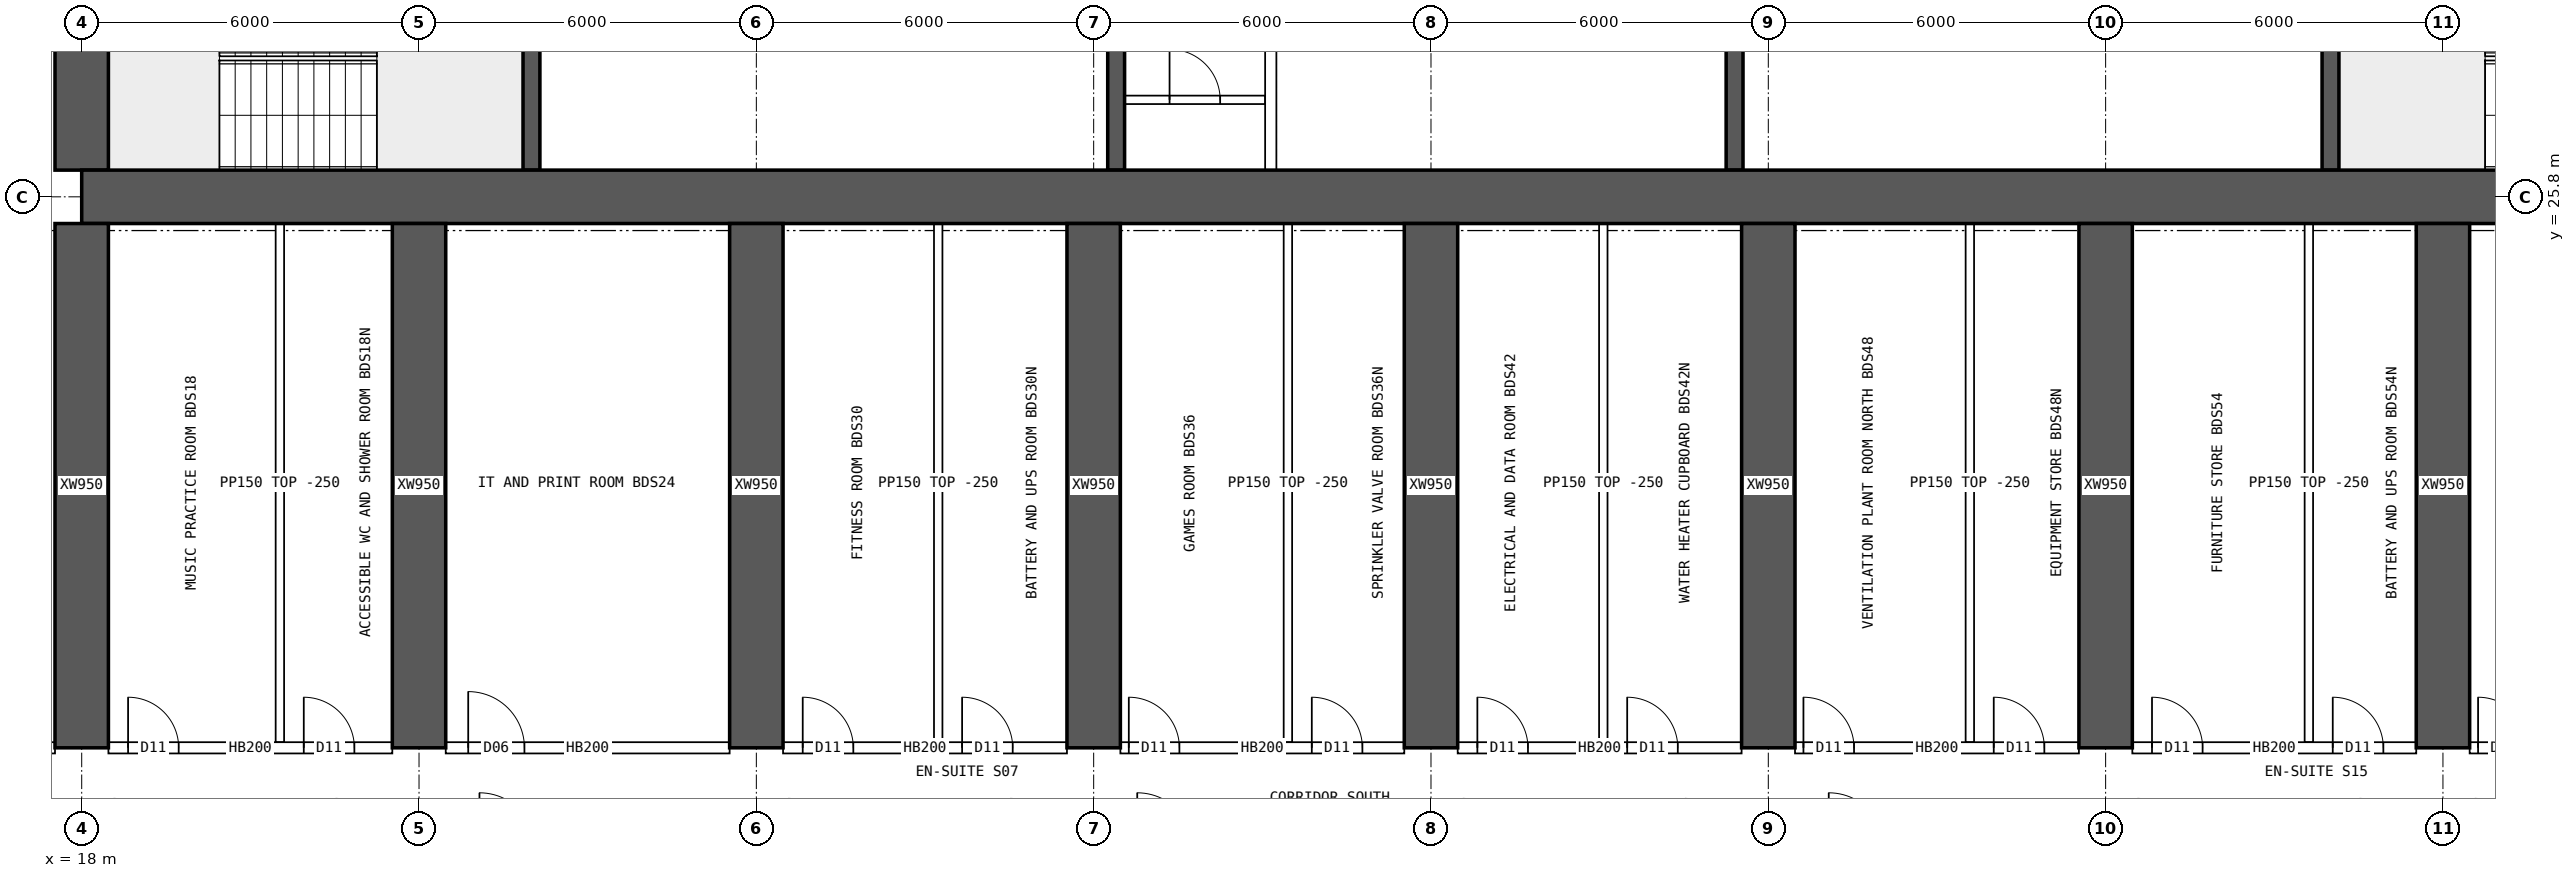
"""IFC4 building model, lengths in metres.
Left out: names, types, materials, properties, quantities, classifications, styles, units other than length and angle.
Written with IfcOpenShell. Run it as: python <this file> out.ifc"""

import sys

from ifc_helpers import new_model, si_unit, direction, frame, frame_2d, origin, place, context, subcontext, project, spatial, rectangle, extrude, element, fill, save


model = new_model("IFC4")
c1 = context("Model", 3, precision=1e-05, world=origin(), true_north=direction((0.0, 1.0)))
c2 = subcontext(c1, "Body", "Model", "MODEL_VIEW")
j1 = project(units=[si_unit("LENGTHUNIT", "METRE"), si_unit("PLANEANGLEUNIT", "RADIAN")], contexts=[c1])
p1 = place(None, origin())
s1 = spatial("IfcSite", under=j1, at=p1, CompositionType="ELEMENT")
p2 = place(p1, origin())
s2 = spatial("IfcBuilding", under=s1, at=p2, CompositionType="ELEMENT")
p3 = place(p2, frame((0.0, 0.0, 99.4)))
s3 = spatial("IfcBuildingStorey", under=s2, at=p3, CompositionType="ELEMENT", Elevation=99.4)
p4 = place(p3, frame((18.0, 25.8, 0.0), z_axis=(0.0, 0.0, 1.0), x_axis=(1.0, 0.0, 0.0)))
e1 = element("IfcWall", 1, at=p4, inside=s3, PredefinedType="SHEAR", context=c2, shape_type="SweptSolid", body=[
    extrude(rectangle(XDim=48.0, YDim=0.95, at=frame_2d((24.0, 0.0))), origin(), (0.0, 0.0, 1.0), 3.75),
])
p5 = place(p3, frame((18.0, 26.275, 0.0), z_axis=(0.0, 0.0, 1.0), x_axis=(0.0, 1.0, 0.0)))
e2 = element("IfcWall", 2, at=p5, inside=s3, PredefinedType="SHEAR", context=c2, shape_type="SweptSolid", body=[
    extrude(rectangle(XDim=11.45, YDim=0.95, at=frame_2d((5.725, 0.0))), origin(), (0.0, 0.0, 1.0), 3.75),
])
p6 = place(p5, frame((5.025, 0.0, 0.0)))
e3 = element("IfcOpeningElement", 3, at=p6, cuts=e2, PredefinedType="OPENING", context=c2, shape_type="SweptSolid", body=[
    extrude(rectangle(XDim=1.2, YDim=2.1, at=frame_2d((0.6, 1.05))), frame((0.0, 0.485, 0.0), z_axis=(0.0, -1.0, 0.0), x_axis=(1.0, 0.0, 0.0)), (0.0, 0.0, 1.0), 0.97),
])
for number, where, z_axis, x_axis in (
    (4, (26.0, 26.275, 0.0), (0.0, 0.0, 1.0), (0.0, 1.0, 0.0)),
    (5, (58.0, 26.275, 0.0), (0.0, 0.0, 1.0), (0.0, 1.0, 0.0)),
    (6, (36.4, 26.275, 0.0), (0.0, 0.0, 1.0), (0.0, 1.0, 0.0)),
    (7, (47.4, 26.275, 0.0), (0.0, 0.0, 1.0), (0.0, 1.0, 0.0)),
):
    element("IfcWall", number, at=place(p3, frame(where, z_axis=z_axis, x_axis=x_axis)), inside=s3, PredefinedType="SHEAR", context=c2, shape_type="SweptSolid", body=[
        extrude(rectangle(XDim=3.975, YDim=0.3, at=frame_2d((1.988, 0.0))), origin(), (0.0, 0.0, 1.0), 3.75),
    ])
for number, where, z_axis, x_axis in (
    (8, (18.0, 16.0, 0.0), (0.0, 0.0, 1.0), (0.0, 1.0, 0.0)),
    (9, (24.0, 16.0, 0.0), (0.0, 0.0, 1.0), (0.0, 1.0, 0.0)),
    (10, (30.0, 16.0, 0.0), (0.0, 0.0, 1.0), (0.0, 1.0, 0.0)),
    (11, (36.0, 16.0, 0.0), (0.0, 0.0, 1.0), (0.0, 1.0, 0.0)),
    (12, (42.0, 16.0, 0.0), (0.0, 0.0, 1.0), (0.0, 1.0, 0.0)),
    (13, (48.0, 16.0, 0.0), (0.0, 0.0, 1.0), (0.0, 1.0, 0.0)),
    (14, (54.0, 16.0, 0.0), (0.0, 0.0, 1.0), (0.0, 1.0, 0.0)),
    (15, (60.0, 16.0, 0.0), (0.0, 0.0, 1.0), (0.0, 1.0, 0.0)),
):
    element("IfcWall", number, at=place(p3, frame(where, z_axis=z_axis, x_axis=x_axis)), inside=s3, PredefinedType="SHEAR", context=c2, shape_type="SweptSolid", body=[
        extrude(rectangle(XDim=9.325, YDim=0.95, at=frame_2d((4.663, 0.0))), origin(), (0.0, 0.0, 1.0), 3.75),
    ])
p7 = place(p3, frame((36.55, 27.525, 0.0), z_axis=(0.0, 0.0, 1.0), x_axis=(1.0, 0.0, 0.0)))
e16 = element("IfcWall", 16, at=p7, inside=s3, PredefinedType="SOLIDWALL", context=c2, shape_type="SweptSolid", body=[
    extrude(rectangle(XDim=2.5, YDim=0.15, at=frame_2d((1.25, 0.0))), origin(), (0.0, 0.0, 1.0), 3.5),
])
p8 = place(p7, frame((0.8, 0.0, 0.0)))
e17 = element("IfcOpeningElement", 17, at=p8, cuts=e16, PredefinedType="OPENING", context=c2, shape_type="SweptSolid", body=[
    extrude(rectangle(XDim=0.9, YDim=2.1, at=frame_2d((0.45, 1.05))), frame((0.0, 0.085, 0.0), z_axis=(0.0, -1.0, 0.0), x_axis=(1.0, 0.0, 0.0)), (0.0, 0.0, 1.0), 0.17),
])
p9 = place(p3, frame((39.15, 26.275, 0.0), z_axis=(0.0, 0.0, 1.0), x_axis=(0.0, 1.0, 0.0)))
e18 = element("IfcWall", 18, at=p9, inside=s3, PredefinedType="SOLIDWALL", context=c2, shape_type="SweptSolid", body=[
    extrude(rectangle(XDim=3.975, YDim=0.2, at=frame_2d((1.988, 0.0))), origin(), (0.0, 0.0, 1.0), 3.5),
])
p10 = place(p3, frame((12.475, 16.0, 0.0), z_axis=(0.0, 0.0, 1.0), x_axis=(1.0, 0.0, 0.0)))
e19 = element("IfcWall", 19, at=p10, inside=s3, PredefinedType="SOLIDWALL", context=c2, shape_type="SweptSolid", body=[
    extrude(rectangle(XDim=5.05, YDim=0.2, at=frame_2d((2.525, 0.0))), origin(), (0.0, 0.0, 1.0), 3.5),
])
p11 = place(p10, frame((3.325, 0.0, 0.0)))
e20 = element("IfcOpeningElement", 20, at=p11, cuts=e19, PredefinedType="OPENING", context=c2, shape_type="SweptSolid", body=[
    extrude(rectangle(XDim=1.6, YDim=2.1, at=frame_2d((0.8, 1.05))), frame((0.0, 0.11, 0.0), z_axis=(0.0, -1.0, 0.0), x_axis=(1.0, 0.0, 0.0)), (0.0, 0.0, 1.0), 0.22),
])
p12 = place(p3, frame((18.475, 16.0, 0.0), z_axis=(0.0, 0.0, 1.0), x_axis=(1.0, 0.0, 0.0)))
e21 = element("IfcWall", 21, at=p12, inside=s3, PredefinedType="SOLIDWALL", context=c2, shape_type="SweptSolid", body=[
    extrude(rectangle(XDim=5.05, YDim=0.2, at=frame_2d((2.525, 0.0))), origin(), (0.0, 0.0, 1.0), 3.5),
])
p13 = place(p12, frame((0.35, 0.0, 0.0)))
e22 = element("IfcOpeningElement", 22, at=p13, cuts=e21, PredefinedType="OPENING", context=c2, shape_type="SweptSolid", body=[
    extrude(rectangle(XDim=0.9, YDim=2.1, at=frame_2d((0.45, 1.05))), frame((0.0, 0.11, 0.0), z_axis=(0.0, -1.0, 0.0), x_axis=(1.0, 0.0, 0.0)), (0.0, 0.0, 1.0), 0.22),
])
p14 = place(p12, frame((3.475, 0.0, 0.0)))
e23 = element("IfcOpeningElement", 23, at=p14, cuts=e21, PredefinedType="OPENING", context=c2, shape_type="SweptSolid", body=[
    extrude(rectangle(XDim=0.9, YDim=2.1, at=frame_2d((0.45, 1.05))), frame((0.0, 0.11, 0.0), z_axis=(0.0, -1.0, 0.0), x_axis=(1.0, 0.0, 0.0)), (0.0, 0.0, 1.0), 0.22),
])
p15 = place(p3, frame((24.475, 16.0, 0.0), z_axis=(0.0, 0.0, 1.0), x_axis=(1.0, 0.0, 0.0)))
e24 = element("IfcWall", 24, at=p15, inside=s3, PredefinedType="SOLIDWALL", context=c2, shape_type="SweptSolid", body=[
    extrude(rectangle(XDim=5.05, YDim=0.2, at=frame_2d((2.525, 0.0))), origin(), (0.0, 0.0, 1.0), 3.5),
])
p16 = place(p15, frame((0.4, 0.0, 0.0)))
e25 = element("IfcOpeningElement", 25, at=p16, cuts=e24, PredefinedType="OPENING", context=c2, shape_type="SweptSolid", body=[
    extrude(rectangle(XDim=1.0, YDim=2.1, at=frame_2d((0.5, 1.05))), frame((0.0, 0.11, 0.0), z_axis=(0.0, -1.0, 0.0), x_axis=(1.0, 0.0, 0.0)), (0.0, 0.0, 1.0), 0.22),
])
p17 = place(p3, frame((30.475, 16.0, 0.0), z_axis=(0.0, 0.0, 1.0), x_axis=(1.0, 0.0, 0.0)))
e26 = element("IfcWall", 26, at=p17, inside=s3, PredefinedType="SOLIDWALL", context=c2, shape_type="SweptSolid", body=[
    extrude(rectangle(XDim=5.05, YDim=0.2, at=frame_2d((2.525, 0.0))), origin(), (0.0, 0.0, 1.0), 3.5),
])
p18 = place(p17, frame((0.35, 0.0, 0.0)))
e27 = element("IfcOpeningElement", 27, at=p18, cuts=e26, PredefinedType="OPENING", context=c2, shape_type="SweptSolid", body=[
    extrude(rectangle(XDim=0.9, YDim=2.1, at=frame_2d((0.45, 1.05))), frame((0.0, 0.11, 0.0), z_axis=(0.0, -1.0, 0.0), x_axis=(1.0, 0.0, 0.0)), (0.0, 0.0, 1.0), 0.22),
])
p19 = place(p17, frame((3.185, 0.0, 0.0)))
e28 = element("IfcOpeningElement", 28, at=p19, cuts=e26, PredefinedType="OPENING", context=c2, shape_type="SweptSolid", body=[
    extrude(rectangle(XDim=0.9, YDim=2.1, at=frame_2d((0.45, 1.05))), frame((0.0, 0.11, 0.0), z_axis=(0.0, -1.0, 0.0), x_axis=(1.0, 0.0, 0.0)), (0.0, 0.0, 1.0), 0.22),
])
p20 = place(p3, frame((36.475, 16.0, 0.0), z_axis=(0.0, 0.0, 1.0), x_axis=(1.0, 0.0, 0.0)))
e29 = element("IfcWall", 29, at=p20, inside=s3, PredefinedType="SOLIDWALL", context=c2, shape_type="SweptSolid", body=[
    extrude(rectangle(XDim=5.05, YDim=0.2, at=frame_2d((2.525, 0.0))), origin(), (0.0, 0.0, 1.0), 3.5),
])
p21 = place(p20, frame((0.15, 0.0, 0.0)))
e30 = element("IfcOpeningElement", 30, at=p21, cuts=e29, PredefinedType="OPENING", context=c2, shape_type="SweptSolid", body=[
    extrude(rectangle(XDim=0.9, YDim=2.1, at=frame_2d((0.45, 1.05))), frame((0.0, 0.11, 0.0), z_axis=(0.0, -1.0, 0.0), x_axis=(1.0, 0.0, 0.0)), (0.0, 0.0, 1.0), 0.22),
])
p22 = place(p20, frame((3.405, 0.0, 0.0)))
e31 = element("IfcOpeningElement", 31, at=p22, cuts=e29, PredefinedType="OPENING", context=c2, shape_type="SweptSolid", body=[
    extrude(rectangle(XDim=0.9, YDim=2.1, at=frame_2d((0.45, 1.05))), frame((0.0, 0.11, 0.0), z_axis=(0.0, -1.0, 0.0), x_axis=(1.0, 0.0, 0.0)), (0.0, 0.0, 1.0), 0.22),
])
p23 = place(p3, frame((42.475, 16.0, 0.0), z_axis=(0.0, 0.0, 1.0), x_axis=(1.0, 0.0, 0.0)))
e32 = element("IfcWall", 32, at=p23, inside=s3, PredefinedType="SOLIDWALL", context=c2, shape_type="SweptSolid", body=[
    extrude(rectangle(XDim=5.05, YDim=0.2, at=frame_2d((2.525, 0.0))), origin(), (0.0, 0.0, 1.0), 3.5),
])
p24 = place(p23, frame((0.35, 0.0, 0.0)))
e33 = element("IfcOpeningElement", 33, at=p24, cuts=e32, PredefinedType="OPENING", context=c2, shape_type="SweptSolid", body=[
    extrude(rectangle(XDim=0.9, YDim=2.1, at=frame_2d((0.45, 1.05))), frame((0.0, 0.11, 0.0), z_axis=(0.0, -1.0, 0.0), x_axis=(1.0, 0.0, 0.0)), (0.0, 0.0, 1.0), 0.22),
])
p25 = place(p23, frame((3.015, 0.0, 0.0)))
e34 = element("IfcOpeningElement", 34, at=p25, cuts=e32, PredefinedType="OPENING", context=c2, shape_type="SweptSolid", body=[
    extrude(rectangle(XDim=0.9, YDim=2.1, at=frame_2d((0.45, 1.05))), frame((0.0, 0.11, 0.0), z_axis=(0.0, -1.0, 0.0), x_axis=(1.0, 0.0, 0.0)), (0.0, 0.0, 1.0), 0.22),
])
p26 = place(p3, frame((48.475, 16.0, 0.0), z_axis=(0.0, 0.0, 1.0), x_axis=(1.0, 0.0, 0.0)))
e35 = element("IfcWall", 35, at=p26, inside=s3, PredefinedType="SOLIDWALL", context=c2, shape_type="SweptSolid", body=[
    extrude(rectangle(XDim=5.05, YDim=0.2, at=frame_2d((2.525, 0.0))), origin(), (0.0, 0.0, 1.0), 3.5),
])
p27 = place(p26, frame((0.15, 0.0, 0.0)))
e36 = element("IfcOpeningElement", 36, at=p27, cuts=e35, PredefinedType="OPENING", context=c2, shape_type="SweptSolid", body=[
    extrude(rectangle(XDim=0.9, YDim=2.1, at=frame_2d((0.45, 1.05))), frame((0.0, 0.11, 0.0), z_axis=(0.0, -1.0, 0.0), x_axis=(1.0, 0.0, 0.0)), (0.0, 0.0, 1.0), 0.22),
])
p28 = place(p26, frame((3.535, 0.0, 0.0)))
e37 = element("IfcOpeningElement", 37, at=p28, cuts=e35, PredefinedType="OPENING", context=c2, shape_type="SweptSolid", body=[
    extrude(rectangle(XDim=0.9, YDim=2.1, at=frame_2d((0.45, 1.05))), frame((0.0, 0.11, 0.0), z_axis=(0.0, -1.0, 0.0), x_axis=(1.0, 0.0, 0.0)), (0.0, 0.0, 1.0), 0.22),
])
p29 = place(p3, frame((54.475, 16.0, 0.0), z_axis=(0.0, 0.0, 1.0), x_axis=(1.0, 0.0, 0.0)))
e38 = element("IfcWall", 38, at=p29, inside=s3, PredefinedType="SOLIDWALL", context=c2, shape_type="SweptSolid", body=[
    extrude(rectangle(XDim=5.05, YDim=0.2, at=frame_2d((2.525, 0.0))), origin(), (0.0, 0.0, 1.0), 3.5),
])
p30 = place(p29, frame((0.35, 0.0, 0.0)))
e39 = element("IfcOpeningElement", 39, at=p30, cuts=e38, PredefinedType="OPENING", context=c2, shape_type="SweptSolid", body=[
    extrude(rectangle(XDim=0.9, YDim=2.1, at=frame_2d((0.45, 1.05))), frame((0.0, 0.11, 0.0), z_axis=(0.0, -1.0, 0.0), x_axis=(1.0, 0.0, 0.0)), (0.0, 0.0, 1.0), 0.22),
])
p31 = place(p29, frame((3.565, 0.0, 0.0)))
e40 = element("IfcOpeningElement", 40, at=p31, cuts=e38, PredefinedType="OPENING", context=c2, shape_type="SweptSolid", body=[
    extrude(rectangle(XDim=0.9, YDim=2.1, at=frame_2d((0.45, 1.05))), frame((0.0, 0.11, 0.0), z_axis=(0.0, -1.0, 0.0), x_axis=(1.0, 0.0, 0.0)), (0.0, 0.0, 1.0), 0.22),
])
p32 = place(p3, frame((60.475, 16.0, 0.0), z_axis=(0.0, 0.0, 1.0), x_axis=(1.0, 0.0, 0.0)))
e41 = element("IfcWall", 41, at=p32, inside=s3, PredefinedType="SOLIDWALL", context=c2, shape_type="SweptSolid", body=[
    extrude(rectangle(XDim=5.05, YDim=0.2, at=frame_2d((2.525, 0.0))), origin(), (0.0, 0.0, 1.0), 3.5),
])
p33 = place(p32, frame((0.15, 0.0, 0.0)))
e42 = element("IfcOpeningElement", 42, at=p33, cuts=e41, PredefinedType="OPENING", context=c2, shape_type="SweptSolid", body=[
    extrude(rectangle(XDim=0.9, YDim=2.1, at=frame_2d((0.45, 1.05))), frame((0.0, 0.11, 0.0), z_axis=(0.0, -1.0, 0.0), x_axis=(1.0, 0.0, 0.0)), (0.0, 0.0, 1.0), 0.22),
])
p34 = place(p32, frame((3.185, 0.0, 0.0)))
e43 = element("IfcOpeningElement", 43, at=p34, cuts=e41, PredefinedType="OPENING", context=c2, shape_type="SweptSolid", body=[
    extrude(rectangle(XDim=0.9, YDim=2.1, at=frame_2d((0.45, 1.05))), frame((0.0, 0.11, 0.0), z_axis=(0.0, -1.0, 0.0), x_axis=(1.0, 0.0, 0.0)), (0.0, 0.0, 1.0), 0.22),
])
for number, where, z_axis, x_axis in (
    (44, (21.525, 16.1, 0.0), (0.0, 0.0, 1.0), (0.0, 1.0, 0.0)),
    (45, (33.235, 16.1, 0.0), (0.0, 0.0, 1.0), (0.0, 1.0, 0.0)),
    (46, (39.455, 16.1, 0.0), (0.0, 0.0, 1.0), (0.0, 1.0, 0.0)),
    (47, (45.065, 16.1, 0.0), (0.0, 0.0, 1.0), (0.0, 1.0, 0.0)),
    (48, (51.585, 16.1, 0.0), (0.0, 0.0, 1.0), (0.0, 1.0, 0.0)),
    (49, (57.615, 16.1, 0.0), (0.0, 0.0, 1.0), (0.0, 1.0, 0.0)),
):
    element("IfcWall", number, at=place(p3, frame(where, z_axis=z_axis, x_axis=x_axis)), inside=s3, PredefinedType="PARTITIONING", context=c2, shape_type="SweptSolid", body=[
        extrude(rectangle(XDim=9.225, YDim=0.15, at=frame_2d((4.612, 0.0))), origin(), (0.0, 0.0, 1.0), 3.5),
    ])
p35 = place(p8, origin())
e50 = element("IfcDoor", 50, at=p35, inside=s3, OperationType="SINGLE_SWING_LEFT", PredefinedType="DOOR", context=c2, shape_type="SweptSolid", body=[
    extrude(rectangle(XDim=0.9, YDim=2.1, at=frame_2d((0.45, 1.05))), frame((0.0, 0.025, 0.0), z_axis=(0.0, -1.0, 0.0), x_axis=(1.0, 0.0, 0.0)), (0.0, 0.0, 1.0), 0.05),
])
fill(e17, e50)
p36 = place(p13, origin())
e51 = element("IfcDoor", 51, at=p36, inside=s3, OperationType="SINGLE_SWING_LEFT", PredefinedType="DOOR", context=c2, shape_type="SweptSolid", body=[
    extrude(rectangle(XDim=0.9, YDim=2.1, at=frame_2d((0.45, 1.05))), frame((0.0, 0.025, 0.0), z_axis=(0.0, -1.0, 0.0), x_axis=(1.0, 0.0, 0.0)), (0.0, 0.0, 1.0), 0.05),
])
fill(e22, e51)
p37 = place(p14, origin())
e52 = element("IfcDoor", 52, at=p37, inside=s3, OperationType="SINGLE_SWING_LEFT", PredefinedType="DOOR", context=c2, shape_type="SweptSolid", body=[
    extrude(rectangle(XDim=0.9, YDim=2.1, at=frame_2d((0.45, 1.05))), frame((0.0, 0.025, 0.0), z_axis=(0.0, -1.0, 0.0), x_axis=(1.0, 0.0, 0.0)), (0.0, 0.0, 1.0), 0.05),
])
fill(e23, e52)
p38 = place(p16, origin())
e53 = element("IfcDoor", 53, at=p38, inside=s3, OperationType="SINGLE_SWING_LEFT", PredefinedType="DOOR", context=c2, shape_type="SweptSolid", body=[
    extrude(rectangle(XDim=1.0, YDim=2.1, at=frame_2d((0.5, 1.05))), frame((0.0, 0.025, 0.0), z_axis=(0.0, -1.0, 0.0), x_axis=(1.0, 0.0, 0.0)), (0.0, 0.0, 1.0), 0.05),
])
fill(e25, e53)
p39 = place(p18, origin())
e54 = element("IfcDoor", 54, at=p39, inside=s3, OperationType="SINGLE_SWING_LEFT", PredefinedType="DOOR", context=c2, shape_type="SweptSolid", body=[
    extrude(rectangle(XDim=0.9, YDim=2.1, at=frame_2d((0.45, 1.05))), frame((0.0, 0.025, 0.0), z_axis=(0.0, -1.0, 0.0), x_axis=(1.0, 0.0, 0.0)), (0.0, 0.0, 1.0), 0.05),
])
fill(e27, e54)
p40 = place(p19, origin())
e55 = element("IfcDoor", 55, at=p40, inside=s3, OperationType="SINGLE_SWING_LEFT", PredefinedType="DOOR", context=c2, shape_type="SweptSolid", body=[
    extrude(rectangle(XDim=0.9, YDim=2.1, at=frame_2d((0.45, 1.05))), frame((0.0, 0.025, 0.0), z_axis=(0.0, -1.0, 0.0), x_axis=(1.0, 0.0, 0.0)), (0.0, 0.0, 1.0), 0.05),
])
fill(e28, e55)
p41 = place(p21, origin())
e56 = element("IfcDoor", 56, at=p41, inside=s3, OperationType="SINGLE_SWING_LEFT", PredefinedType="DOOR", context=c2, shape_type="SweptSolid", body=[
    extrude(rectangle(XDim=0.9, YDim=2.1, at=frame_2d((0.45, 1.05))), frame((0.0, 0.025, 0.0), z_axis=(0.0, -1.0, 0.0), x_axis=(1.0, 0.0, 0.0)), (0.0, 0.0, 1.0), 0.05),
])
fill(e30, e56)
p42 = place(p22, origin())
e57 = element("IfcDoor", 57, at=p42, inside=s3, OperationType="SINGLE_SWING_LEFT", PredefinedType="DOOR", context=c2, shape_type="SweptSolid", body=[
    extrude(rectangle(XDim=0.9, YDim=2.1, at=frame_2d((0.45, 1.05))), frame((0.0, 0.025, 0.0), z_axis=(0.0, -1.0, 0.0), x_axis=(1.0, 0.0, 0.0)), (0.0, 0.0, 1.0), 0.05),
])
fill(e31, e57)
p43 = place(p24, origin())
e58 = element("IfcDoor", 58, at=p43, inside=s3, OperationType="SINGLE_SWING_LEFT", PredefinedType="DOOR", context=c2, shape_type="SweptSolid", body=[
    extrude(rectangle(XDim=0.9, YDim=2.1, at=frame_2d((0.45, 1.05))), frame((0.0, 0.025, 0.0), z_axis=(0.0, -1.0, 0.0), x_axis=(1.0, 0.0, 0.0)), (0.0, 0.0, 1.0), 0.05),
])
fill(e33, e58)
p44 = place(p25, origin())
e59 = element("IfcDoor", 59, at=p44, inside=s3, OperationType="SINGLE_SWING_LEFT", PredefinedType="DOOR", context=c2, shape_type="SweptSolid", body=[
    extrude(rectangle(XDim=0.9, YDim=2.1, at=frame_2d((0.45, 1.05))), frame((0.0, 0.025, 0.0), z_axis=(0.0, -1.0, 0.0), x_axis=(1.0, 0.0, 0.0)), (0.0, 0.0, 1.0), 0.05),
])
fill(e34, e59)
p45 = place(p27, origin())
e60 = element("IfcDoor", 60, at=p45, inside=s3, OperationType="SINGLE_SWING_LEFT", PredefinedType="DOOR", context=c2, shape_type="SweptSolid", body=[
    extrude(rectangle(XDim=0.9, YDim=2.1, at=frame_2d((0.45, 1.05))), frame((0.0, 0.025, 0.0), z_axis=(0.0, -1.0, 0.0), x_axis=(1.0, 0.0, 0.0)), (0.0, 0.0, 1.0), 0.05),
])
fill(e36, e60)
p46 = place(p28, origin())
e61 = element("IfcDoor", 61, at=p46, inside=s3, OperationType="SINGLE_SWING_LEFT", PredefinedType="DOOR", context=c2, shape_type="SweptSolid", body=[
    extrude(rectangle(XDim=0.9, YDim=2.1, at=frame_2d((0.45, 1.05))), frame((0.0, 0.025, 0.0), z_axis=(0.0, -1.0, 0.0), x_axis=(1.0, 0.0, 0.0)), (0.0, 0.0, 1.0), 0.05),
])
fill(e37, e61)
p47 = place(p30, origin())
e62 = element("IfcDoor", 62, at=p47, inside=s3, OperationType="SINGLE_SWING_LEFT", PredefinedType="DOOR", context=c2, shape_type="SweptSolid", body=[
    extrude(rectangle(XDim=0.9, YDim=2.1, at=frame_2d((0.45, 1.05))), frame((0.0, 0.025, 0.0), z_axis=(0.0, -1.0, 0.0), x_axis=(1.0, 0.0, 0.0)), (0.0, 0.0, 1.0), 0.05),
])
fill(e39, e62)
p48 = place(p31, origin())
e63 = element("IfcDoor", 63, at=p48, inside=s3, OperationType="SINGLE_SWING_LEFT", PredefinedType="DOOR", context=c2, shape_type="SweptSolid", body=[
    extrude(rectangle(XDim=0.9, YDim=2.1, at=frame_2d((0.45, 1.05))), frame((0.0, 0.025, 0.0), z_axis=(0.0, -1.0, 0.0), x_axis=(1.0, 0.0, 0.0)), (0.0, 0.0, 1.0), 0.05),
])
fill(e40, e63)
p49 = place(p33, origin())
e64 = element("IfcDoor", 64, at=p49, inside=s3, OperationType="SINGLE_SWING_LEFT", PredefinedType="DOOR", context=c2, shape_type="SweptSolid", body=[
    extrude(rectangle(XDim=0.9, YDim=2.1, at=frame_2d((0.45, 1.05))), frame((0.0, 0.025, 0.0), z_axis=(0.0, -1.0, 0.0), x_axis=(1.0, 0.0, 0.0)), (0.0, 0.0, 1.0), 0.05),
])
fill(e42, e64)
save(model, sys.argv[1])
